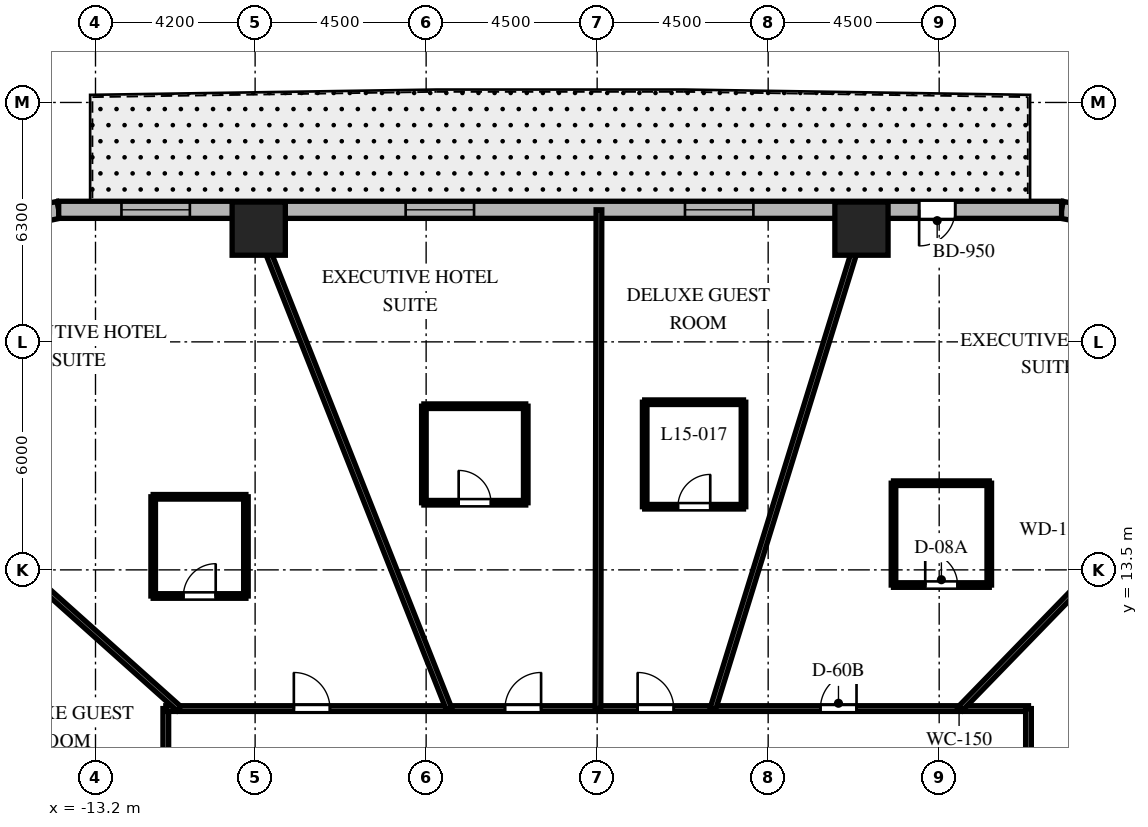
"""IFC4 building model, lengths in metres.
Left out: names, types, materials, properties, quantities, classifications, styles, units other than length and angle.
Written with IfcOpenShell. Run it as: python <this file> out.ifc"""

import sys

from ifc_helpers import new_model, si_unit, direction, frame, frame_2d, origin, origin_2d, place, context, subcontext, project, spatial, rectangle, extrude, element, fill, save


model = new_model("IFC4")
c1 = context("Model", 3, precision=1e-05, world=origin(), true_north=direction((0.0, 1.0)))
c2 = subcontext(c1, "Body", "Model", "MODEL_VIEW")
j1 = project(units=[si_unit("LENGTHUNIT", "METRE"), si_unit("PLANEANGLEUNIT", "RADIAN")], contexts=[c1])
p1 = place(None, origin())
s1 = spatial("IfcSite", under=j1, at=p1, CompositionType="ELEMENT")
p2 = place(p1, origin())
s2 = spatial("IfcBuilding", under=s1, at=p2, CompositionType="ELEMENT")
p3 = place(p2, frame((0.0, 0.0, 67.5)))
s3 = spatial("IfcBuildingStorey", under=s2, at=p3, CompositionType="ELEMENT", Elevation=67.5)
for number, where, z_axis, x_axis in (
    (1, (6.955, 22.48, 0.0), (0.0, 0.0, 1.0), (1.0, 0.0, 0.0)),
    (2, (-8.905, 22.48, 0.0), (0.0, 0.0, 1.0), (1.0, 0.0, 0.0)),
):
    element("IfcColumn", number, at=place(p3, frame(where, z_axis=z_axis, x_axis=x_axis)), inside=s3, PredefinedType="COLUMN", context=c2, shape_type="SweptSolid", body=[
        extrude(rectangle(XDim=1.4, YDim=1.4, at=origin_2d()), origin(), (0.0, 0.0, 1.0), 3.7),
    ])
p4 = place(p3, frame((13.468, 22.74, 0.0), z_axis=(0.0, 0.0, 1.0), x_axis=(-0.982717174228, 0.185113358451, 0.0)))
e3 = element("IfcWall", 3, at=p4, inside=s3, PredefinedType="SOLIDWALL", context=c2, shape_type="SweptSolid", body=[
    extrude(rectangle(XDim=1.269, YDim=0.45, at=frame_2d((0.634, 0.0))), origin(), (0.0, 0.0, 1.0), 3.4),
])
p5 = place(p3, frame((-14.168, 22.975, 0.0), z_axis=(0.0, 0.0, 1.0), x_axis=(-0.978770371074, -0.204959900243, 0.0)))
e4 = element("IfcWall", 4, at=p5, inside=s3, PredefinedType="SOLIDWALL", context=c2, shape_type="SweptSolid", body=[
    extrude(rectangle(XDim=1.406, YDim=0.45, at=frame_2d((0.703, 0.0))), origin(), (0.0, 0.0, 1.0), 3.4),
])
p6 = place(p3, frame((12.221, 22.975, 0.0), z_axis=(0.0, 0.0, 1.0), x_axis=(-1.0, 0.0, 0.0)))
e5 = element("IfcWall", 5, at=p6, inside=s3, PredefinedType="SOLIDWALL", context=c2, shape_type="SweptSolid", body=[
    extrude(rectangle(XDim=26.389, YDim=0.45, at=frame_2d((13.195, 0.0))), origin(), (0.0, 0.0, 1.0), 3.4),
])
p7 = place(p6, frame((2.799, 0.0, 0.0)))
e6 = element("IfcOpeningElement", 6, at=p7, cuts=e5, PredefinedType="OPENING", context=c2, shape_type="SweptSolid", body=[
    extrude(rectangle(XDim=0.95, YDim=2.15, at=frame_2d((0.475, 1.075))), frame((0.0, 0.235, 0.0), z_axis=(0.0, -1.0, 0.0), x_axis=(1.0, 0.0, 0.0)), (0.0, 0.0, 1.0), 0.47),
])
p8 = place(p6, frame((8.11, 0.0, 0.8)))
e7 = element("IfcOpeningElement", 7, at=p8, cuts=e5, PredefinedType="OPENING", context=c2, shape_type="SweptSolid", body=[
    extrude(rectangle(XDim=1.8, YDim=1.8, at=frame_2d((0.9, 0.9))), frame((0.0, 0.235, 0.0), z_axis=(0.0, -1.0, 0.0), x_axis=(1.0, 0.0, 0.0)), (0.0, 0.0, 1.0), 0.47),
])
p9 = place(p6, frame((15.46, 0.0, 0.8)))
e8 = element("IfcOpeningElement", 8, at=p9, cuts=e5, PredefinedType="OPENING", context=c2, shape_type="SweptSolid", body=[
    extrude(rectangle(XDim=1.8, YDim=1.8, at=frame_2d((0.9, 0.9))), frame((0.0, 0.235, 0.0), z_axis=(0.0, -1.0, 0.0), x_axis=(1.0, 0.0, 0.0)), (0.0, 0.0, 1.0), 0.47),
])
p10 = place(p6, frame((22.938, 0.0, 0.8)))
e9 = element("IfcOpeningElement", 9, at=p10, cuts=e5, PredefinedType="OPENING", context=c2, shape_type="SweptSolid", body=[
    extrude(rectangle(XDim=1.8, YDim=1.8, at=frame_2d((0.9, 0.9))), frame((0.0, 0.235, 0.0), z_axis=(0.0, -1.0, 0.0), x_axis=(1.0, 0.0, 0.0)), (0.0, 0.0, 1.0), 0.47),
])
p11 = place(p3, frame((-11.35, -9.85, 0.0), z_axis=(0.0, 0.0, 1.0), x_axis=(0.0, 1.0, 0.0)))
e10 = element("IfcWall", 10, at=p11, inside=s3, PredefinedType="PARTITIONING", context=c2, shape_type="SweptSolid", body=[
    extrude(rectangle(XDim=19.7, YDim=0.15, at=frame_2d((9.85, 0.0))), origin(), (0.0, 0.0, 1.0), 2.84),
])
p12 = place(p11, frame((16.714, 0.0, 0.0)))
e11 = element("IfcOpeningElement", 11, at=p12, cuts=e10, PredefinedType="OPENING", context=c2, shape_type="SweptSolid", body=[
    extrude(rectangle(XDim=0.95, YDim=2.03, at=frame_2d((0.475, 1.015))), frame((0.0, 0.085, 0.0), z_axis=(0.0, -1.0, 0.0), x_axis=(1.0, 0.0, 0.0)), (0.0, 0.0, 1.0), 0.17),
])
p13 = place(p11, frame((12.932, 0.0, 0.0)))
e12 = element("IfcOpeningElement", 12, at=p13, cuts=e10, PredefinedType="OPENING", context=c2, shape_type="SweptSolid", body=[
    extrude(rectangle(XDim=0.95, YDim=2.03, at=frame_2d((0.475, 1.015))), frame((0.0, 0.085, 0.0), z_axis=(0.0, -1.0, 0.0), x_axis=(1.0, 0.0, 0.0)), (0.0, 0.0, 1.0), 0.17),
])
p14 = place(p11, frame((8.838, 0.0, 0.0)))
e13 = element("IfcOpeningElement", 13, at=p14, cuts=e10, PredefinedType="OPENING", context=c2, shape_type="SweptSolid", body=[
    extrude(rectangle(XDim=0.95, YDim=2.03, at=frame_2d((0.475, 1.015))), frame((0.0, 0.085, 0.0), z_axis=(0.0, -1.0, 0.0), x_axis=(1.0, 0.0, 0.0)), (0.0, 0.0, 1.0), 0.17),
])
p15 = place(p11, frame((3.024, 0.0, 0.0)))
e14 = element("IfcOpeningElement", 14, at=p15, cuts=e10, PredefinedType="OPENING", context=c2, shape_type="SweptSolid", body=[
    extrude(rectangle(XDim=0.95, YDim=2.03, at=frame_2d((0.475, 1.015))), frame((0.0, 0.085, 0.0), z_axis=(0.0, -1.0, 0.0), x_axis=(1.0, 0.0, 0.0)), (0.0, 0.0, 1.0), 0.17),
])
p16 = place(p3, frame((-11.35, 9.85, 0.0), z_axis=(0.0, 0.0, 1.0), x_axis=(1.0, 0.0, 0.0)))
e15 = element("IfcWall", 15, at=p16, inside=s3, PredefinedType="PARTITIONING", context=c2, shape_type="SweptSolid", body=[
    extrude(rectangle(XDim=22.7, YDim=0.15, at=frame_2d((11.35, 0.0))), origin(), (0.0, 0.0, 1.0), 2.84),
])
p17 = place(p16, frame((17.225, 0.0, 0.0)))
e16 = element("IfcOpeningElement", 16, at=p17, cuts=e15, PredefinedType="OPENING", context=c2, shape_type="SweptSolid", body=[
    extrude(rectangle(XDim=0.95, YDim=2.03, at=frame_2d((0.475, 1.015))), frame((0.0, 0.085, 0.0), z_axis=(0.0, -1.0, 0.0), x_axis=(1.0, 0.0, 0.0)), (0.0, 0.0, 1.0), 0.17),
])
p18 = place(p16, frame((12.415, 0.0, 0.0)))
e17 = element("IfcOpeningElement", 17, at=p18, cuts=e15, PredefinedType="OPENING", context=c2, shape_type="SweptSolid", body=[
    extrude(rectangle(XDim=0.95, YDim=2.03, at=frame_2d((0.475, 1.015))), frame((0.0, 0.085, 0.0), z_axis=(0.0, -1.0, 0.0), x_axis=(1.0, 0.0, 0.0)), (0.0, 0.0, 1.0), 0.17),
])
p19 = place(p16, frame((8.925, 0.0, 0.0)))
e18 = element("IfcOpeningElement", 18, at=p19, cuts=e15, PredefinedType="OPENING", context=c2, shape_type="SweptSolid", body=[
    extrude(rectangle(XDim=0.95, YDim=2.03, at=frame_2d((0.475, 1.015))), frame((0.0, 0.085, 0.0), z_axis=(0.0, -1.0, 0.0), x_axis=(1.0, 0.0, 0.0)), (0.0, 0.0, 1.0), 0.17),
])
p20 = place(p16, frame((3.369, 0.0, 0.0)))
e19 = element("IfcOpeningElement", 19, at=p20, cuts=e15, PredefinedType="OPENING", context=c2, shape_type="SweptSolid", body=[
    extrude(rectangle(XDim=0.95, YDim=2.03, at=frame_2d((0.475, 1.015))), frame((0.0, 0.085, 0.0), z_axis=(0.0, -1.0, 0.0), x_axis=(1.0, 0.0, 0.0)), (0.0, 0.0, 1.0), 0.17),
])
p21 = place(p3, frame((11.35, 9.85, 0.0), z_axis=(0.0, 0.0, 1.0), x_axis=(0.0, -1.0, 0.0)))
e20 = element("IfcWall", 20, at=p21, inside=s3, PredefinedType="PARTITIONING", context=c2, shape_type="SweptSolid", body=[
    extrude(rectangle(XDim=19.7, YDim=0.15, at=frame_2d((9.85, 0.0))), origin(), (0.0, 0.0, 1.0), 2.84),
])
p22 = place(p21, frame((3.024, 0.0, 0.0)))
e21 = element("IfcOpeningElement", 21, at=p22, cuts=e20, PredefinedType="OPENING", context=c2, shape_type="SweptSolid", body=[
    extrude(rectangle(XDim=0.95, YDim=2.03, at=frame_2d((0.475, 1.015))), frame((0.0, 0.085, 0.0), z_axis=(0.0, -1.0, 0.0), x_axis=(1.0, 0.0, 0.0)), (0.0, 0.0, 1.0), 0.17),
])
p23 = place(p21, frame((15.191, 0.0, 0.0)))
e22 = element("IfcOpeningElement", 22, at=p23, cuts=e20, PredefinedType="OPENING", context=c2, shape_type="SweptSolid", body=[
    extrude(rectangle(XDim=0.95, YDim=2.03, at=frame_2d((0.475, 1.015))), frame((0.0, 0.085, 0.0), z_axis=(0.0, -1.0, 0.0), x_axis=(1.0, 0.0, 0.0)), (0.0, 0.0, 1.0), 0.17),
])
p24 = place(p21, frame((8.838, 0.0, 0.0)))
e23 = element("IfcOpeningElement", 23, at=p24, cuts=e20, PredefinedType="OPENING", context=c2, shape_type="SweptSolid", body=[
    extrude(rectangle(XDim=0.95, YDim=2.03, at=frame_2d((0.475, 1.015))), frame((0.0, 0.085, 0.0), z_axis=(0.0, -1.0, 0.0), x_axis=(1.0, 0.0, 0.0)), (0.0, 0.0, 1.0), 0.17),
])
p25 = place(p3, frame((9.558, 9.85, 0.0), z_axis=(0.0, 0.0, 1.0), x_axis=(0.69638346089, 0.717669893056, 0.0)))
e24 = element("IfcWall", 24, at=p25, inside=s3, PredefinedType="PARTITIONING", context=c2, shape_type="SweptSolid", body=[
    extrude(rectangle(XDim=10.701, YDim=0.15, at=frame_2d((5.351, 0.0))), origin(), (0.0, 0.0, 1.0), 2.54),
])
p26 = place(p3, frame((3.048, 9.85, 0.0), z_axis=(0.0, 0.0, 1.0), x_axis=(0.295553992761, 0.955326037206, 0.0)))
e25 = element("IfcWall", 25, at=p26, inside=s3, PredefinedType="PARTITIONING", context=c2, shape_type="SweptSolid", body=[
    extrude(rectangle(XDim=13.739, YDim=0.15, at=frame_2d((6.869, 0.0))), origin(), (0.0, 0.0, 1.0), 2.54),
])
p27 = place(p3, frame((0.021, 9.85, 0.0), z_axis=(0.0, 0.0, 1.0), x_axis=(0.002064727742, 0.999997868447, 0.0)))
e26 = element("IfcWall", 26, at=p27, inside=s3, PredefinedType="PARTITIONING", context=c2, shape_type="SweptSolid", body=[
    extrude(rectangle(XDim=13.125, YDim=0.15, at=frame_2d((6.562, 0.0))), origin(), (0.0, 0.0, 1.0), 2.54),
])
p28 = place(p3, frame((-3.902, 9.85, 0.0), z_axis=(0.0, 0.0, 1.0), x_axis=(-0.36828765711, 0.929711891728, 0.0)))
e27 = element("IfcWall", 27, at=p28, inside=s3, PredefinedType="PARTITIONING", context=c2, shape_type="SweptSolid", body=[
    extrude(rectangle(XDim=14.117, YDim=0.15, at=frame_2d((7.059, 0.0))), origin(), (0.0, 0.0, 1.0), 2.54),
])
p29 = place(p3, frame((-11.007, 9.85, 0.0), z_axis=(0.0, 0.0, 1.0), x_axis=(-0.745177305978, 0.666866390407, 0.0)))
e28 = element("IfcWall", 28, at=p29, inside=s3, PredefinedType="PARTITIONING", context=c2, shape_type="SweptSolid", body=[
    extrude(rectangle(XDim=10.375, YDim=0.15, at=frame_2d((5.188, 0.0))), origin(), (0.0, 0.0, 1.0), 2.54),
])
p30 = place(p3, frame((-11.35, 5.068, 0.0), z_axis=(0.0, 0.0, 1.0), x_axis=(-0.913107192911, 0.407719577963, 0.0)))
e29 = element("IfcWall", 29, at=p30, inside=s3, PredefinedType="PARTITIONING", context=c2, shape_type="SweptSolid", body=[
    extrude(rectangle(XDim=10.841, YDim=0.15, at=frame_2d((5.421, 0.0))), origin(), (0.0, 0.0, 1.0), 2.54),
])
p31 = place(p3, frame((7.798, 13.101, 0.0), z_axis=(0.0, 0.0, 1.0), x_axis=(1.0, 0.0, 0.0)))
e30 = element("IfcWall", 30, at=p31, inside=s3, PredefinedType="PARTITIONING", context=c2, shape_type="SweptSolid", body=[
    extrude(rectangle(XDim=2.52, YDim=0.12, at=frame_2d((1.26, 0.0))), origin(), (0.0, 0.0, 1.0), 2.84),
])
p32 = place(p31, frame((0.835, 0.0, 0.0)))
e31 = element("IfcOpeningElement", 31, at=p32, cuts=e30, PredefinedType="OPENING", context=c2, shape_type="SweptSolid", body=[
    extrude(rectangle(XDim=0.85, YDim=2.03, at=frame_2d((0.425, 1.015))), frame((0.0, 0.07, 0.0), z_axis=(0.0, -1.0, 0.0), x_axis=(1.0, 0.0, 0.0)), (0.0, 0.0, 1.0), 0.14),
])
p33 = place(p3, frame((10.318, 13.101, 0.0), z_axis=(0.0, 0.0, 1.0), x_axis=(0.0, 1.0, 0.0)))
e32 = element("IfcWall", 32, at=p33, inside=s3, PredefinedType="PARTITIONING", context=c2, shape_type="SweptSolid", body=[
    extrude(rectangle(XDim=2.68, YDim=0.12, at=frame_2d((1.34, 0.0))), origin(), (0.0, 0.0, 1.0), 3.4),
])
p34 = place(p3, frame((10.318, 15.781, 0.0), z_axis=(0.0, 0.0, 1.0), x_axis=(-1.0, 0.0, 0.0)))
e33 = element("IfcWall", 33, at=p34, inside=s3, PredefinedType="PARTITIONING", context=c2, shape_type="SweptSolid", body=[
    extrude(rectangle(XDim=2.52, YDim=0.12, at=frame_2d((1.26, 0.0))), origin(), (0.0, 0.0, 1.0), 2.84),
])
p35 = place(p3, frame((7.798, 15.781, 0.0), z_axis=(0.0, 0.0, 1.0), x_axis=(0.0, -1.0, 0.0)))
e34 = element("IfcWall", 34, at=p35, inside=s3, PredefinedType="PARTITIONING", context=c2, shape_type="SweptSolid", body=[
    extrude(rectangle(XDim=2.68, YDim=0.12, at=frame_2d((1.34, 0.0))), origin(), (0.0, 0.0, 1.0), 2.84),
])
p36 = place(p3, frame((1.251, 15.162, 0.0), z_axis=(0.0, 0.0, 1.0), x_axis=(1.0, 0.0, 0.0)))
e35 = element("IfcWall", 35, at=p36, inside=s3, PredefinedType="PARTITIONING", context=c2, shape_type="SweptSolid", body=[
    extrude(rectangle(XDim=2.6, YDim=0.12, at=frame_2d((1.3, 0.0))), origin(), (0.0, 0.0, 1.0), 3.4),
])
p37 = place(p36, frame((0.875, 0.0, 0.0)))
e36 = element("IfcOpeningElement", 36, at=p37, cuts=e35, PredefinedType="OPENING", context=c2, shape_type="SweptSolid", body=[
    extrude(rectangle(XDim=0.85, YDim=2.03, at=frame_2d((0.425, 1.015))), frame((0.0, 0.07, 0.0), z_axis=(0.0, -1.0, 0.0), x_axis=(1.0, 0.0, 0.0)), (0.0, 0.0, 1.0), 0.14),
])
p38 = place(p3, frame((3.851, 15.162, 0.0), z_axis=(0.0, 0.0, 1.0), x_axis=(0.0, 1.0, 0.0)))
e37 = element("IfcWall", 37, at=p38, inside=s3, PredefinedType="PARTITIONING", context=c2, shape_type="SweptSolid", body=[
    extrude(rectangle(XDim=2.75, YDim=0.12, at=frame_2d((1.375, 0.0))), origin(), (0.0, 0.0, 1.0), 2.84),
])
p39 = place(p3, frame((3.851, 17.912, 0.0), z_axis=(0.0, 0.0, 1.0), x_axis=(-1.0, 0.0, 0.0)))
e38 = element("IfcWall", 38, at=p39, inside=s3, PredefinedType="PARTITIONING", context=c2, shape_type="SweptSolid", body=[
    extrude(rectangle(XDim=2.6, YDim=0.12, at=frame_2d((1.3, 0.0))), origin(), (0.0, 0.0, 1.0), 3.4),
])
p40 = place(p3, frame((1.251, 17.912, 0.0), z_axis=(0.0, 0.0, 1.0), x_axis=(0.0, -1.0, 0.0)))
e39 = element("IfcWall", 39, at=p40, inside=s3, PredefinedType="PARTITIONING", context=c2, shape_type="SweptSolid", body=[
    extrude(rectangle(XDim=2.75, YDim=0.12, at=frame_2d((1.375, 0.0))), origin(), (0.0, 0.0, 1.0), 2.84),
])
p41 = place(p3, frame((-4.559, 15.267, 0.0), z_axis=(0.0, 0.0, 1.0), x_axis=(1.0, 0.0, 0.0)))
e40 = element("IfcWall", 40, at=p41, inside=s3, PredefinedType="PARTITIONING", context=c2, shape_type="SweptSolid", body=[
    extrude(rectangle(XDim=2.68, YDim=0.12, at=frame_2d((1.34, 0.0))), origin(), (0.0, 0.0, 1.0), 3.4),
])
p42 = place(p41, frame((0.915, 0.0, 0.0)))
e41 = element("IfcOpeningElement", 41, at=p42, cuts=e40, PredefinedType="OPENING", context=c2, shape_type="SweptSolid", body=[
    extrude(rectangle(XDim=0.85, YDim=2.03, at=frame_2d((0.425, 1.015))), frame((0.0, 0.07, 0.0), z_axis=(0.0, -1.0, 0.0), x_axis=(1.0, 0.0, 0.0)), (0.0, 0.0, 1.0), 0.14),
])
p43 = place(p3, frame((-1.879, 15.267, 0.0), z_axis=(0.0, 0.0, 1.0), x_axis=(0.0, 1.0, 0.0)))
e42 = element("IfcWall", 42, at=p43, inside=s3, PredefinedType="PARTITIONING", context=c2, shape_type="SweptSolid", body=[
    extrude(rectangle(XDim=2.54, YDim=0.12, at=frame_2d((1.27, 0.0))), origin(), (0.0, 0.0, 1.0), 2.84),
])
p44 = place(p3, frame((-1.879, 17.807, 0.0), z_axis=(0.0, 0.0, 1.0), x_axis=(-1.0, 0.0, 0.0)))
e43 = element("IfcWall", 43, at=p44, inside=s3, PredefinedType="PARTITIONING", context=c2, shape_type="SweptSolid", body=[
    extrude(rectangle(XDim=2.68, YDim=0.12, at=frame_2d((1.34, 0.0))), origin(), (0.0, 0.0, 1.0), 2.84),
])
p45 = place(p3, frame((-4.559, 17.807, 0.0), z_axis=(0.0, 0.0, 1.0), x_axis=(0.0, -1.0, 0.0)))
e44 = element("IfcWall", 44, at=p45, inside=s3, PredefinedType="PARTITIONING", context=c2, shape_type="SweptSolid", body=[
    extrude(rectangle(XDim=2.54, YDim=0.12, at=frame_2d((1.27, 0.0))), origin(), (0.0, 0.0, 1.0), 2.84),
])
p46 = place(p3, frame((-11.682, 12.813, 0.0), z_axis=(0.0, 0.0, 1.0), x_axis=(1.0, 0.0, 0.0)))
e45 = element("IfcWall", 45, at=p46, inside=s3, PredefinedType="PARTITIONING", context=c2, shape_type="SweptSolid", body=[
    extrude(rectangle(XDim=2.44, YDim=0.12, at=frame_2d((1.22, 0.0))), origin(), (0.0, 0.0, 1.0), 2.972),
])
p47 = place(p46, frame((0.795, 0.0, 0.0)))
e46 = element("IfcOpeningElement", 46, at=p47, cuts=e45, PredefinedType="OPENING", context=c2, shape_type="SweptSolid", body=[
    extrude(rectangle(XDim=0.85, YDim=2.03, at=frame_2d((0.425, 1.015))), frame((0.0, 0.07, 0.0), z_axis=(0.0, -1.0, 0.0), x_axis=(1.0, 0.0, 0.0)), (0.0, 0.0, 1.0), 0.14),
])
p48 = place(p3, frame((-9.242, 12.813, 0.0), z_axis=(0.0, 0.0, 1.0), x_axis=(0.0, 1.0, 0.0)))
e47 = element("IfcWall", 47, at=p48, inside=s3, PredefinedType="PARTITIONING", context=c2, shape_type="SweptSolid", body=[
    extrude(rectangle(XDim=2.61, YDim=0.12, at=frame_2d((1.305, 0.0))), origin(), (0.0, 0.0, 1.0), 2.972),
])
p49 = place(p3, frame((-9.242, 15.423, 0.0), z_axis=(0.0, 0.0, 1.0), x_axis=(-1.0, 0.0, 0.0)))
e48 = element("IfcWall", 48, at=p49, inside=s3, PredefinedType="PARTITIONING", context=c2, shape_type="SweptSolid", body=[
    extrude(rectangle(XDim=2.44, YDim=0.12, at=frame_2d((1.22, 0.0))), origin(), (0.0, 0.0, 1.0), 3.4),
])
p50 = place(p3, frame((-11.682, 15.423, 0.0), z_axis=(0.0, 0.0, 1.0), x_axis=(0.0, -1.0, 0.0)))
e49 = element("IfcWall", 49, at=p50, inside=s3, PredefinedType="PARTITIONING", context=c2, shape_type="SweptSolid", body=[
    extrude(rectangle(XDim=2.61, YDim=0.12, at=frame_2d((1.305, 0.0))), origin(), (0.0, 0.0, 1.0), 3.4),
])
p51 = place(p7, origin())
e50 = element("IfcDoor", 50, at=p51, inside=s3, OperationType="SINGLE_SWING_RIGHT", PredefinedType="DOOR", context=c2, shape_type="SweptSolid", body=[
    extrude(rectangle(XDim=0.95, YDim=2.15, at=frame_2d((0.475, 1.075))), frame((0.0, 0.025, 0.0), z_axis=(0.0, -1.0, 0.0), x_axis=(1.0, 0.0, 0.0)), (0.0, 0.0, 1.0), 0.05),
])
fill(e6, e50)
p52 = place(p8, origin())
e51 = element("IfcWindow", 51, at=p52, inside=s3, PartitioningType="SINGLE_PANEL", PredefinedType="WINDOW", context=c2, shape_type="SweptSolid", body=[
    extrude(rectangle(XDim=1.8, YDim=1.8, at=frame_2d((0.9, 0.9))), frame((0.0, 0.03, 0.0), z_axis=(0.0, -1.0, 0.0), x_axis=(1.0, 0.0, 0.0)), (0.0, 0.0, 1.0), 0.06),
])
fill(e7, e51)
p53 = place(p9, origin())
e52 = element("IfcWindow", 52, at=p53, inside=s3, PartitioningType="SINGLE_PANEL", PredefinedType="WINDOW", context=c2, shape_type="SweptSolid", body=[
    extrude(rectangle(XDim=1.8, YDim=1.8, at=frame_2d((0.9, 0.9))), frame((0.0, 0.03, 0.0), z_axis=(0.0, -1.0, 0.0), x_axis=(1.0, 0.0, 0.0)), (0.0, 0.0, 1.0), 0.06),
])
fill(e8, e52)
p54 = place(p10, origin())
e53 = element("IfcWindow", 53, at=p54, inside=s3, PartitioningType="SINGLE_PANEL", PredefinedType="WINDOW", context=c2, shape_type="SweptSolid", body=[
    extrude(rectangle(XDim=1.8, YDim=1.8, at=frame_2d((0.9, 0.9))), frame((0.0, 0.03, 0.0), z_axis=(0.0, -1.0, 0.0), x_axis=(1.0, 0.0, 0.0)), (0.0, 0.0, 1.0), 0.06),
])
fill(e9, e53)
p55 = place(p17, origin())
e54 = element("IfcDoor", 54, at=p55, inside=s3, OperationType="SINGLE_SWING_RIGHT", PredefinedType="DOOR", context=c2, shape_type="SweptSolid", body=[
    extrude(rectangle(XDim=0.95, YDim=2.03, at=frame_2d((0.475, 1.015))), frame((0.0, 0.025, 0.0), z_axis=(0.0, -1.0, 0.0), x_axis=(1.0, 0.0, 0.0)), (0.0, 0.0, 1.0), 0.05),
])
fill(e16, e54)
p56 = place(p32, origin())
e55 = element("IfcDoor", 55, at=p56, inside=s3, OperationType="SINGLE_SWING_LEFT", PredefinedType="DOOR", context=c2, shape_type="SweptSolid", body=[
    extrude(rectangle(XDim=0.85, YDim=2.03, at=frame_2d((0.425, 1.015))), frame((0.0, 0.025, 0.0), z_axis=(0.0, -1.0, 0.0), x_axis=(1.0, 0.0, 0.0)), (0.0, 0.0, 1.0), 0.05),
])
fill(e31, e55)
p57 = place(p18, origin())
e56 = element("IfcDoor", 56, at=p57, inside=s3, OperationType="SINGLE_SWING_LEFT", PredefinedType="DOOR", context=c2, shape_type="SweptSolid", body=[
    extrude(rectangle(XDim=0.95, YDim=2.03, at=frame_2d((0.475, 1.015))), frame((0.0, 0.025, 0.0), z_axis=(0.0, -1.0, 0.0), x_axis=(1.0, 0.0, 0.0)), (0.0, 0.0, 1.0), 0.05),
])
fill(e17, e56)
p58 = place(p37, origin())
e57 = element("IfcDoor", 57, at=p58, inside=s3, OperationType="SINGLE_SWING_RIGHT", PredefinedType="DOOR", context=c2, shape_type="SweptSolid", body=[
    extrude(rectangle(XDim=0.85, YDim=2.03, at=frame_2d((0.425, 1.015))), frame((0.0, 0.025, 0.0), z_axis=(0.0, -1.0, 0.0), x_axis=(1.0, 0.0, 0.0)), (0.0, 0.0, 1.0), 0.05),
])
fill(e36, e57)
p59 = place(p19, origin())
e58 = element("IfcDoor", 58, at=p59, inside=s3, OperationType="SINGLE_SWING_RIGHT", PredefinedType="DOOR", context=c2, shape_type="SweptSolid", body=[
    extrude(rectangle(XDim=0.95, YDim=2.03, at=frame_2d((0.475, 1.015))), frame((0.0, 0.025, 0.0), z_axis=(0.0, -1.0, 0.0), x_axis=(1.0, 0.0, 0.0)), (0.0, 0.0, 1.0), 0.05),
])
fill(e18, e58)
p60 = place(p42, origin())
e59 = element("IfcDoor", 59, at=p60, inside=s3, OperationType="SINGLE_SWING_LEFT", PredefinedType="DOOR", context=c2, shape_type="SweptSolid", body=[
    extrude(rectangle(XDim=0.85, YDim=2.03, at=frame_2d((0.425, 1.015))), frame((0.0, 0.025, 0.0), z_axis=(0.0, -1.0, 0.0), x_axis=(1.0, 0.0, 0.0)), (0.0, 0.0, 1.0), 0.05),
])
fill(e41, e59)
p61 = place(p20, origin())
e60 = element("IfcDoor", 60, at=p61, inside=s3, OperationType="SINGLE_SWING_LEFT", PredefinedType="DOOR", context=c2, shape_type="SweptSolid", body=[
    extrude(rectangle(XDim=0.95, YDim=2.03, at=frame_2d((0.475, 1.015))), frame((0.0, 0.025, 0.0), z_axis=(0.0, -1.0, 0.0), x_axis=(1.0, 0.0, 0.0)), (0.0, 0.0, 1.0), 0.05),
])
fill(e19, e60)
p62 = place(p47, origin())
e61 = element("IfcDoor", 61, at=p62, inside=s3, OperationType="SINGLE_SWING_RIGHT", PredefinedType="DOOR", context=c2, shape_type="SweptSolid", body=[
    extrude(rectangle(XDim=0.85, YDim=2.03, at=frame_2d((0.425, 1.015))), frame((0.0, 0.025, 0.0), z_axis=(0.0, -1.0, 0.0), x_axis=(1.0, 0.0, 0.0)), (0.0, 0.0, 1.0), 0.05),
])
fill(e46, e61)
save(model, sys.argv[1])
